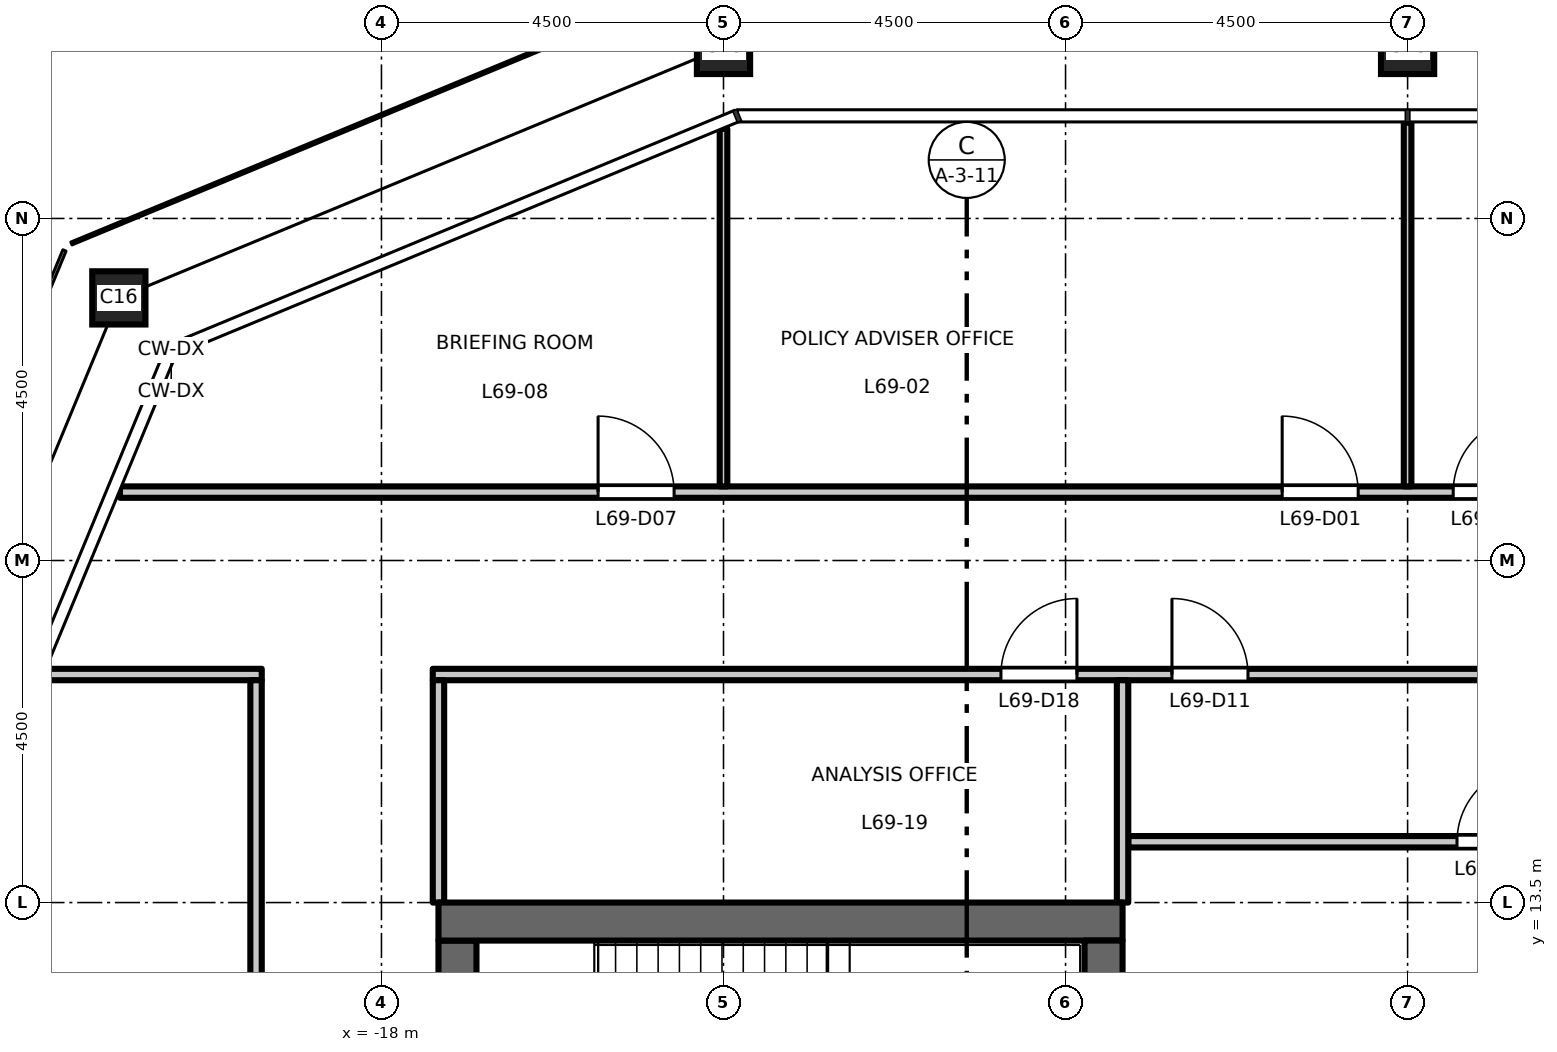
"""IFC4 building model, lengths in metres.
Left out: names, types, materials, properties, quantities, classifications, styles, units other than length and angle.
Written with IfcOpenShell. Run it as: python <this file> out.ifc"""

import sys

from ifc_helpers import new_model, si_unit, direction, frame, frame_2d, origin, origin_2d, place, context, subcontext, project, spatial, rectangle, hollow_rectangle, extrude, element, fill, save


model = new_model("IFC4")
c1 = context("Model", 3, precision=1e-05, world=origin(), true_north=direction((0.0, 1.0)))
c2 = subcontext(c1, "Body", "Model", "MODEL_VIEW")
j1 = project(units=[si_unit("LENGTHUNIT", "METRE"), si_unit("PLANEANGLEUNIT", "RADIAN")], contexts=[c1])
p1 = place(None, origin())
s1 = spatial("IfcSite", under=j1, at=p1, CompositionType="ELEMENT")
p2 = place(p1, origin())
s2 = spatial("IfcBuilding", under=s1, at=p2, CompositionType="ELEMENT")
p3 = place(p2, frame((0.0, 0.0, 321.2)))
s3 = spatial("IfcBuildingStorey", under=s2, at=p3, CompositionType="ELEMENT", Elevation=321.2)
for number, where, z_axis, x_axis in (
    (1, (-4.5, 24.75, 0.0), (0.0, 0.0, 1.0), (1.0, 0.0, 0.0)),
    (2, (-13.5, 24.75, 0.0), (0.0, 0.0, 1.0), (1.0, 0.0, 0.0)),
    (3, (-21.455, 21.455, 0.0), (0.0, 0.0, 1.0), (1.0, 0.0, 0.0)),
):
    element("IfcColumn", number, at=place(p3, frame(where, z_axis=z_axis, x_axis=x_axis)), inside=s3, PredefinedType="COLUMN", context=c2, shape_type="SweptSolid", body=[
        extrude(hollow_rectangle(XDim=0.7, YDim=0.7, WallThickness=0.036, at=origin_2d()), origin(), (0.0, 0.0, 1.0), 4.5),
    ])
p4 = place(p3, frame((-17.0, -13.0, 0.0), z_axis=(0.0, 0.0, 1.0), x_axis=(0.0, 1.0, 0.0)))
e4 = element("IfcWall", 4, at=p4, inside=s3, PredefinedType="SHEAR", context=c2, shape_type="SweptSolid", body=[
    extrude(rectangle(XDim=26.0, YDim=0.5, at=frame_2d((13.0, 0.0))), origin(), (0.0, 0.0, 1.0), 4.35),
])
p5 = place(p4, frame((16.825, 0.0, 0.0)))
e5 = element("IfcOpeningElement", 5, at=p5, cuts=e4, PredefinedType="OPENING", context=c2, shape_type="SweptSolid", body=[
    extrude(rectangle(XDim=1.8, YDim=2.1, at=frame_2d((0.9, 1.05))), frame((0.0, 0.26, 0.0), z_axis=(0.0, -1.0, 0.0), x_axis=(1.0, 0.0, 0.0)), (0.0, 0.0, 1.0), 0.52),
])
p6 = place(p4, frame((7.375, 0.0, 0.0)))
e6 = element("IfcOpeningElement", 6, at=p6, cuts=e4, PredefinedType="OPENING", context=c2, shape_type="SweptSolid", body=[
    extrude(rectangle(XDim=1.8, YDim=2.1, at=frame_2d((0.9, 1.05))), frame((0.0, 0.26, 0.0), z_axis=(0.0, -1.0, 0.0), x_axis=(1.0, 0.0, 0.0)), (0.0, 0.0, 1.0), 0.52),
])
p7 = place(p3, frame((-8.25, 13.25, 0.0), z_axis=(0.0, 0.0, 1.0), x_axis=(-1.0, 0.0, 0.0)))
e7 = element("IfcWall", 7, at=p7, inside=s3, PredefinedType="SHEAR", context=c2, shape_type="SweptSolid", body=[
    extrude(rectangle(XDim=9.0, YDim=0.5, at=frame_2d((4.5, 0.0))), origin(), (0.0, 0.0, 1.0), 4.35),
])
p8 = place(p3, frame((-8.5, -13.0, 0.0), z_axis=(0.0, 0.0, 1.0), x_axis=(0.0, 1.0, 0.0)))
e8 = element("IfcWall", 8, at=p8, inside=s3, PredefinedType="SHEAR", context=c2, shape_type="SweptSolid", body=[
    extrude(rectangle(XDim=26.0, YDim=0.5, at=frame_2d((13.0, 0.0))), origin(), (0.0, 0.0, 1.0), 4.35),
])
p9 = place(p3, frame((-8.175, 14.3, 0.0), z_axis=(0.0, 0.0, 1.0), x_axis=(1.0, 0.0, 0.0)))
e9 = element("IfcWall", 9, at=p9, inside=s3, PredefinedType="PARTITIONING", context=c2, shape_type="SweptSolid", body=[
    extrude(rectangle(XDim=14.835, YDim=0.15, at=frame_2d((7.417, 0.0))), origin(), (0.0, 0.0, 1.0), 4.35),
])
p10 = place(p9, frame((4.325, 0.0, 0.0)))
e10 = element("IfcOpeningElement", 10, at=p10, cuts=e9, PredefinedType="OPENING", context=c2, shape_type="SweptSolid", body=[
    extrude(rectangle(XDim=1.0, YDim=2.1, at=frame_2d((0.5, 1.05))), frame((0.0, 0.085, 0.0), z_axis=(0.0, -1.0, 0.0), x_axis=(1.0, 0.0, 0.0)), (0.0, 0.0, 1.0), 0.17),
])
p11 = place(p9, frame((6.575, 0.0, 0.0)))
e11 = element("IfcOpeningElement", 11, at=p11, cuts=e9, PredefinedType="OPENING", context=c2, shape_type="SweptSolid", body=[
    extrude(rectangle(XDim=1.0, YDim=2.1, at=frame_2d((0.5, 1.05))), frame((0.0, 0.085, 0.0), z_axis=(0.0, -1.0, 0.0), x_axis=(1.0, 0.0, 0.0)), (0.0, 0.0, 1.0), 0.17),
])
p12 = place(p9, frame((13.325, 0.0, 0.0)))
e12 = element("IfcOpeningElement", 12, at=p12, cuts=e9, PredefinedType="OPENING", context=c2, shape_type="SweptSolid", body=[
    extrude(rectangle(XDim=1.0, YDim=2.1, at=frame_2d((0.5, 1.05))), frame((0.0, 0.085, 0.0), z_axis=(0.0, -1.0, 0.0), x_axis=(1.0, 0.0, 0.0)), (0.0, 0.0, 1.0), 0.17),
])
p13 = place(p3, frame((-22.436, 16.5, 0.0), z_axis=(0.0, 0.0, 1.0), x_axis=(1.0, 0.0, 0.0)))
e13 = element("IfcWall", 13, at=p13, inside=s3, PredefinedType="PARTITIONING", context=c2, shape_type="SweptSolid", body=[
    extrude(rectangle(XDim=2.861, YDim=0.15, at=frame_2d((1.431, 0.0))), origin(), (0.0, 0.0, 1.0), 4.35),
])
p14 = place(p3, frame((-17.325, 16.5, 0.0), z_axis=(0.0, 0.0, 1.0), x_axis=(1.0, 0.0, 0.0)))
e14 = element("IfcWall", 14, at=p14, inside=s3, PredefinedType="PARTITIONING", context=c2, shape_type="SweptSolid", body=[
    extrude(rectangle(XDim=34.65, YDim=0.15, at=frame_2d((17.325, 0.0))), origin(), (0.0, 0.0, 1.0), 4.35),
])
p15 = place(p14, frame((9.725, 0.0, 0.0)))
e15 = element("IfcOpeningElement", 15, at=p15, cuts=e14, PredefinedType="OPENING", context=c2, shape_type="SweptSolid", body=[
    extrude(rectangle(XDim=1.0, YDim=2.1, at=frame_2d((0.5, 1.05))), frame((0.0, 0.085, 0.0), z_axis=(0.0, -1.0, 0.0), x_axis=(1.0, 0.0, 0.0)), (0.0, 0.0, 1.0), 0.17),
])
p16 = place(p14, frame((7.475, 0.0, 0.0)))
e16 = element("IfcOpeningElement", 16, at=p16, cuts=e14, PredefinedType="OPENING", context=c2, shape_type="SweptSolid", body=[
    extrude(rectangle(XDim=1.0, YDim=2.1, at=frame_2d((0.5, 1.05))), frame((0.0, 0.085, 0.0), z_axis=(0.0, -1.0, 0.0), x_axis=(1.0, 0.0, 0.0)), (0.0, 0.0, 1.0), 0.17),
])
p17 = place(p14, frame((26.225, 0.0, 0.0)))
e17 = element("IfcOpeningElement", 17, at=p17, cuts=e14, PredefinedType="OPENING", context=c2, shape_type="SweptSolid", body=[
    extrude(rectangle(XDim=1.0, YDim=2.1, at=frame_2d((0.5, 1.05))), frame((0.0, 0.085, 0.0), z_axis=(0.0, -1.0, 0.0), x_axis=(1.0, 0.0, 0.0)), (0.0, 0.0, 1.0), 0.17),
])
p18 = place(p3, frame((-21.441, 18.9, 0.0), z_axis=(0.0, 0.0, 1.0), x_axis=(1.0, 0.0, 0.0)))
e18 = element("IfcWall", 18, at=p18, inside=s3, PredefinedType="PARTITIONING", context=c2, shape_type="SweptSolid", body=[
    extrude(rectangle(XDim=42.882, YDim=0.15, at=frame_2d((21.441, 0.0))), origin(), (0.0, 0.0, 1.0), 4.35),
])
p19 = place(p18, frame((15.291, 0.0, 0.0)))
e19 = element("IfcOpeningElement", 19, at=p19, cuts=e18, PredefinedType="OPENING", context=c2, shape_type="SweptSolid", body=[
    extrude(rectangle(XDim=1.0, YDim=2.1, at=frame_2d((0.5, 1.05))), frame((0.0, 0.085, 0.0), z_axis=(0.0, -1.0, 0.0), x_axis=(1.0, 0.0, 0.0)), (0.0, 0.0, 1.0), 0.17),
])
p20 = place(p18, frame((17.541, 0.0, 0.0)))
e20 = element("IfcOpeningElement", 20, at=p20, cuts=e18, PredefinedType="OPENING", context=c2, shape_type="SweptSolid", body=[
    extrude(rectangle(XDim=1.0, YDim=2.1, at=frame_2d((0.5, 1.05))), frame((0.0, 0.085, 0.0), z_axis=(0.0, -1.0, 0.0), x_axis=(1.0, 0.0, 0.0)), (0.0, 0.0, 1.0), 0.17),
])
p21 = place(p18, frame((33.291, 0.0, 0.0)))
e21 = element("IfcOpeningElement", 21, at=p21, cuts=e18, PredefinedType="OPENING", context=c2, shape_type="SweptSolid", body=[
    extrude(rectangle(XDim=1.0, YDim=2.1, at=frame_2d((0.5, 1.05))), frame((0.0, 0.085, 0.0), z_axis=(0.0, -1.0, 0.0), x_axis=(1.0, 0.0, 0.0)), (0.0, 0.0, 1.0), 0.17),
])
p22 = place(p18, frame((6.291, 0.0, 0.0)))
e22 = element("IfcOpeningElement", 22, at=p22, cuts=e18, PredefinedType="OPENING", context=c2, shape_type="SweptSolid", body=[
    extrude(rectangle(XDim=1.0, YDim=2.1, at=frame_2d((0.5, 1.05))), frame((0.0, 0.085, 0.0), z_axis=(0.0, -1.0, 0.0), x_axis=(1.0, 0.0, 0.0)), (0.0, 0.0, 1.0), 0.17),
])
p23 = place(p18, frame((35.482, 0.0, 0.0)))
e23 = element("IfcOpeningElement", 23, at=p23, cuts=e18, PredefinedType="OPENING", context=c2, shape_type="SweptSolid", body=[
    extrude(rectangle(XDim=1.0, YDim=2.1, at=frame_2d((0.5, 1.05))), frame((0.0, 0.085, 0.0), z_axis=(0.0, -1.0, 0.0), x_axis=(1.0, 0.0, 0.0)), (0.0, 0.0, 1.0), 0.17),
])
p24 = place(p3, frame((-19.65, -16.425, 0.0), z_axis=(0.0, 0.0, 1.0), x_axis=(0.0, 1.0, 0.0)))
e24 = element("IfcWall", 24, at=p24, inside=s3, PredefinedType="PARTITIONING", context=c2, shape_type="SweptSolid", body=[
    extrude(rectangle(XDim=32.85, YDim=0.15, at=frame_2d((16.425, 0.0))), origin(), (0.0, 0.0, 1.0), 4.35),
])
p25 = place(p24, frame((0.525, 0.0, 0.0)))
e25 = element("IfcOpeningElement", 25, at=p25, cuts=e24, PredefinedType="OPENING", context=c2, shape_type="SweptSolid", body=[
    extrude(rectangle(XDim=1.0, YDim=2.1, at=frame_2d((0.5, 1.05))), frame((0.0, 0.085, 0.0), z_axis=(0.0, -1.0, 0.0), x_axis=(1.0, 0.0, 0.0)), (0.0, 0.0, 1.0), 0.17),
])
p26 = place(p3, frame((-17.25, 13.5, 0.0), z_axis=(0.0, 0.0, 1.0), x_axis=(0.0, 1.0, 0.0)))
e26 = element("IfcWall", 26, at=p26, inside=s3, PredefinedType="PARTITIONING", context=c2, shape_type="SweptSolid", body=[
    extrude(rectangle(XDim=2.925, YDim=0.15, at=frame_2d((1.462, 0.0))), origin(), (0.0, 0.0, 1.0), 4.35),
])
p27 = place(p3, frame((-13.5, 18.975, 0.0), z_axis=(0.0, 0.0, 1.0), x_axis=(0.0, 1.0, 0.0)))
e27 = element("IfcWall", 27, at=p27, inside=s3, PredefinedType="PARTITIONING", context=c2, shape_type="SweptSolid", body=[
    extrude(rectangle(XDim=4.703, YDim=0.1, at=frame_2d((2.352, 0.0))), origin(), (0.0, 0.0, 1.0), 3.75),
])
p28 = place(p3, frame((-8.25, 13.5, 0.0), z_axis=(0.0, 0.0, 1.0), x_axis=(0.0, 1.0, 0.0)))
e28 = element("IfcWall", 28, at=p28, inside=s3, PredefinedType="PARTITIONING", context=c2, shape_type="SweptSolid", body=[
    extrude(rectangle(XDim=2.925, YDim=0.15, at=frame_2d((1.462, 0.0))), origin(), (0.0, 0.0, 1.0), 4.35),
])
p29 = place(p3, frame((-4.5, 18.975, 0.0), z_axis=(0.0, 0.0, 1.0), x_axis=(0.0, 1.0, 0.0)))
e29 = element("IfcWall", 29, at=p29, inside=s3, PredefinedType="PARTITIONING", context=c2, shape_type="SweptSolid", body=[
    extrude(rectangle(XDim=4.785, YDim=0.1, at=frame_2d((2.393, 0.0))), origin(), (0.0, 0.0, 1.0), 3.65),
])
p30 = place(p19, origin())
e30 = element("IfcDoor", 30, at=p30, inside=s3, OperationType="SINGLE_SWING_LEFT", PredefinedType="DOOR", context=c2, shape_type="SweptSolid", body=[
    extrude(rectangle(XDim=1.0, YDim=2.1, at=frame_2d((0.5, 1.05))), frame((0.0, 0.025, 0.0), z_axis=(0.0, -1.0, 0.0), x_axis=(1.0, 0.0, 0.0)), (0.0, 0.0, 1.0), 0.05),
])
fill(e19, e30)
p31 = place(p20, origin())
e31 = element("IfcDoor", 31, at=p31, inside=s3, OperationType="SINGLE_SWING_RIGHT", PredefinedType="DOOR", context=c2, shape_type="SweptSolid", body=[
    extrude(rectangle(XDim=1.0, YDim=2.1, at=frame_2d((0.5, 1.05))), frame((0.0, 0.025, 0.0), z_axis=(0.0, -1.0, 0.0), x_axis=(1.0, 0.0, 0.0)), (0.0, 0.0, 1.0), 0.05),
])
fill(e20, e31)
p32 = place(p22, origin())
e32 = element("IfcDoor", 32, at=p32, inside=s3, OperationType="SINGLE_SWING_LEFT", PredefinedType="DOOR", context=c2, shape_type="SweptSolid", body=[
    extrude(rectangle(XDim=1.0, YDim=2.1, at=frame_2d((0.5, 1.05))), frame((0.0, 0.025, 0.0), z_axis=(0.0, -1.0, 0.0), x_axis=(1.0, 0.0, 0.0)), (0.0, 0.0, 1.0), 0.05),
])
fill(e22, e32)
p33 = place(p15, origin())
e33 = element("IfcDoor", 33, at=p33, inside=s3, OperationType="SINGLE_SWING_LEFT", PredefinedType="DOOR", context=c2, shape_type="SweptSolid", body=[
    extrude(rectangle(XDim=1.0, YDim=2.1, at=frame_2d((0.5, 1.05))), frame((0.0, 0.025, 0.0), z_axis=(0.0, -1.0, 0.0), x_axis=(1.0, 0.0, 0.0)), (0.0, 0.0, 1.0), 0.05),
])
fill(e15, e33)
p34 = place(p10, origin())
e34 = element("IfcDoor", 34, at=p34, inside=s3, OperationType="SINGLE_SWING_RIGHT", PredefinedType="DOOR", context=c2, shape_type="SweptSolid", body=[
    extrude(rectangle(XDim=1.0, YDim=2.1, at=frame_2d((0.5, 1.05))), frame((0.0, 0.025, 0.0), z_axis=(0.0, -1.0, 0.0), x_axis=(1.0, 0.0, 0.0)), (0.0, 0.0, 1.0), 0.05),
])
fill(e10, e34)
p35 = place(p16, origin())
e35 = element("IfcDoor", 35, at=p35, inside=s3, OperationType="SINGLE_SWING_RIGHT", PredefinedType="DOOR", context=c2, shape_type="SweptSolid", body=[
    extrude(rectangle(XDim=1.0, YDim=2.1, at=frame_2d((0.5, 1.05))), frame((0.0, 0.025, 0.0), z_axis=(0.0, -1.0, 0.0), x_axis=(1.0, 0.0, 0.0)), (0.0, 0.0, 1.0), 0.05),
])
fill(e16, e35)
save(model, sys.argv[1])
